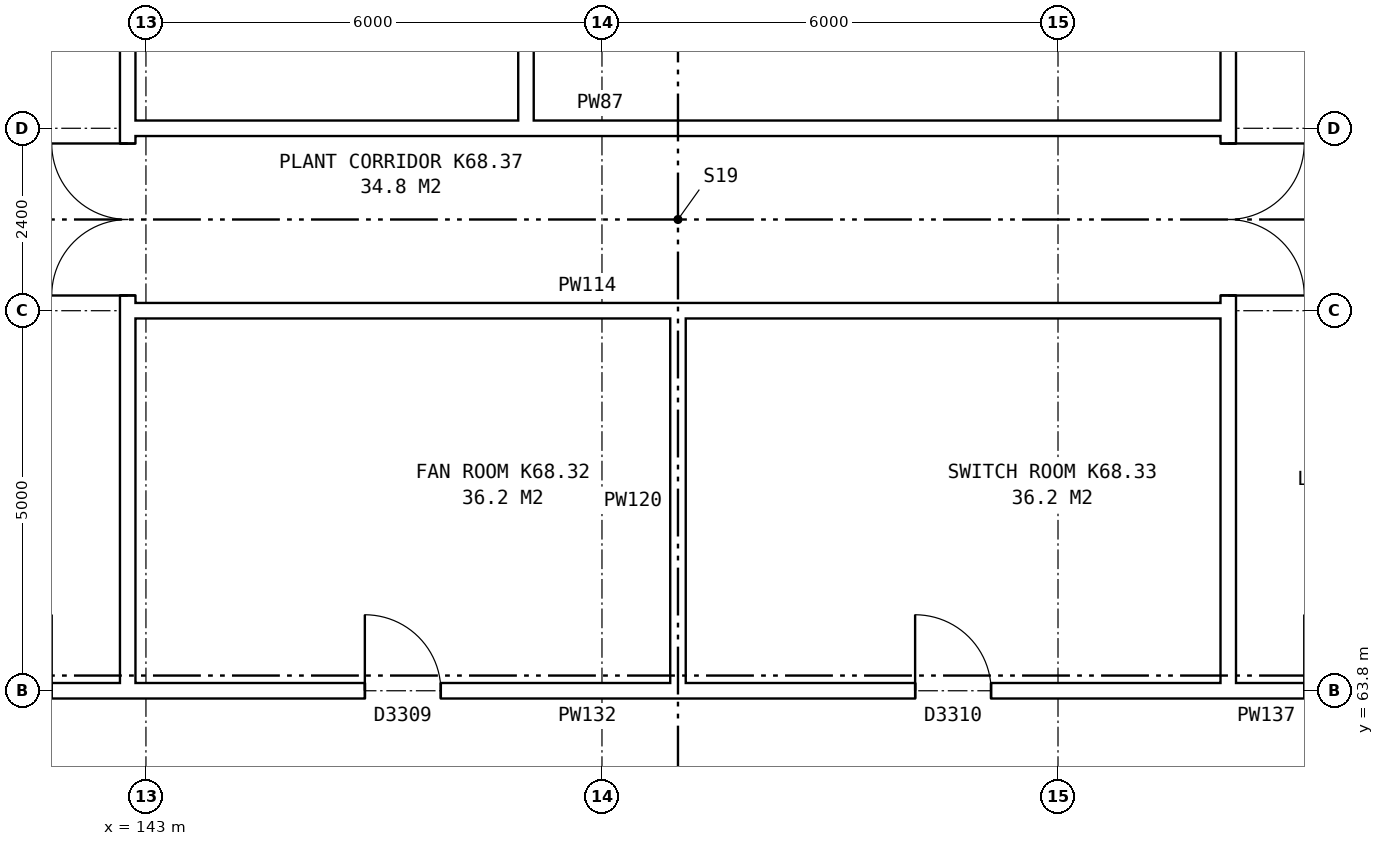
"""IFC4 building model, lengths in metres.
Left out: names, types, materials, properties, quantities, classifications, styles, units other than length and angle.
Written with IfcOpenShell. Run it as: python <this file> out.ifc"""

import sys

from ifc_helpers import new_model, si_unit, direction, frame, frame_2d, origin, place, context, subcontext, project, spatial, rectangle, extrude, element, fill, save


model = new_model("IFC4")
c1 = context("Model", 3, precision=1e-05, world=origin(), true_north=direction((0.0, 1.0)))
c2 = subcontext(c1, "Body", "Model", "MODEL_VIEW")
j1 = project(units=[si_unit("LENGTHUNIT", "METRE"), si_unit("PLANEANGLEUNIT", "RADIAN")], contexts=[c1])
p1 = place(None, origin())
s1 = spatial("IfcSite", under=j1, at=p1, CompositionType="ELEMENT")
p2 = place(p1, origin())
s2 = spatial("IfcBuilding", under=s1, at=p2, CompositionType="ELEMENT")
p3 = place(p2, frame((0.0, 0.0, 243.9)))
s3 = spatial("IfcBuildingStorey", under=s2, at=p3, CompositionType="ELEMENT", Elevation=243.9)
p4 = place(p3, frame((142.76, 63.9, 0.0), z_axis=(0.0, 0.0, 1.0), x_axis=(0.0, 1.0, 0.0)))
e1 = element("IfcWall", 1, at=p4, inside=s3, PredefinedType="PARTITIONING", context=c2, shape_type="SweptSolid", body=[
    extrude(rectangle(XDim=12.2, YDim=0.2, at=frame_2d((6.1, 0.0))), origin(), (0.0, 0.0, 1.0), 3.3),
])
p5 = place(p4, frame((5.1, 0.0, 0.0)))
e2 = element("IfcOpeningElement", 2, at=p5, cuts=e1, PredefinedType="OPENING", context=c2, shape_type="SweptSolid", body=[
    extrude(rectangle(XDim=2.0, YDim=2.1, at=frame_2d((1.0, 1.05))), frame((0.0, 0.11, 0.0), z_axis=(0.0, -1.0, 0.0), x_axis=(1.0, 0.0, 0.0)), (0.0, 0.0, 1.0), 0.22),
])
p6 = place(p3, frame((157.24, 63.9, 0.0), z_axis=(0.0, 0.0, 1.0), x_axis=(0.0, 1.0, 0.0)))
e3 = element("IfcWall", 3, at=p6, inside=s3, PredefinedType="PARTITIONING", context=c2, shape_type="SweptSolid", body=[
    extrude(rectangle(XDim=12.2, YDim=0.2, at=frame_2d((6.1, 0.0))), origin(), (0.0, 0.0, 1.0), 3.3),
])
p7 = place(p6, frame((5.1, 0.0, 0.0)))
e4 = element("IfcOpeningElement", 4, at=p7, cuts=e3, PredefinedType="OPENING", context=c2, shape_type="SweptSolid", body=[
    extrude(rectangle(XDim=2.0, YDim=2.1, at=frame_2d((1.0, 1.05))), frame((0.0, 0.11, 0.0), z_axis=(0.0, -1.0, 0.0), x_axis=(1.0, 0.0, 0.0)), (0.0, 0.0, 1.0), 0.22),
])
p8 = place(p3, frame((142.76, 63.8, 0.0), z_axis=(0.0, 0.0, 1.0), x_axis=(1.0, 0.0, 0.0)))
e5 = element("IfcWall", 5, at=p8, inside=s3, PredefinedType="PARTITIONING", context=c2, shape_type="SweptSolid", body=[
    extrude(rectangle(XDim=14.48, YDim=0.2, at=frame_2d((7.24, 0.0))), origin(), (0.0, 0.0, 1.0), 3.3),
])
p9 = place(p8, frame((3.12, 0.0, 0.0)))
e6 = element("IfcOpeningElement", 6, at=p9, cuts=e5, PredefinedType="OPENING", context=c2, shape_type="SweptSolid", body=[
    extrude(rectangle(XDim=1.0, YDim=2.1, at=frame_2d((0.5, 1.05))), frame((0.0, 0.11, 0.0), z_axis=(0.0, -1.0, 0.0), x_axis=(1.0, 0.0, 0.0)), (0.0, 0.0, 1.0), 0.22),
])
p10 = place(p8, frame((10.36, 0.0, 0.0)))
e7 = element("IfcOpeningElement", 7, at=p10, cuts=e5, PredefinedType="OPENING", context=c2, shape_type="SweptSolid", body=[
    extrude(rectangle(XDim=1.0, YDim=2.1, at=frame_2d((0.5, 1.05))), frame((0.0, 0.11, 0.0), z_axis=(0.0, -1.0, 0.0), x_axis=(1.0, 0.0, 0.0)), (0.0, 0.0, 1.0), 0.22),
])
p11 = place(p3, frame((139.76, 63.8, 0.0), z_axis=(0.0, 0.0, 1.0), x_axis=(1.0, 0.0, 0.0)))
e8 = element("IfcWall", 8, at=p11, inside=s3, PredefinedType="PARTITIONING", context=c2, shape_type="SweptSolid", body=[
    extrude(rectangle(XDim=3.0, YDim=0.2, at=frame_2d((1.5, 0.0))), origin(), (0.0, 0.0, 1.0), 3.3),
])
p12 = place(p11, frame((1.0, 0.0, 0.0)))
e9 = element("IfcOpeningElement", 9, at=p12, cuts=e8, PredefinedType="OPENING", context=c2, shape_type="SweptSolid", body=[
    extrude(rectangle(XDim=1.0, YDim=2.1, at=frame_2d((0.5, 1.05))), frame((0.0, 0.11, 0.0), z_axis=(0.0, -1.0, 0.0), x_axis=(1.0, 0.0, 0.0)), (0.0, 0.0, 1.0), 0.22),
])
p13 = place(p3, frame((157.24, 63.8, 0.0), z_axis=(0.0, 0.0, 1.0), x_axis=(1.0, 0.0, 0.0)))
e10 = element("IfcWall", 10, at=p13, inside=s3, PredefinedType="PARTITIONING", context=c2, shape_type="SweptSolid", body=[
    extrude(rectangle(XDim=3.0, YDim=0.2, at=frame_2d((1.5, 0.0))), origin(), (0.0, 0.0, 1.0), 3.3),
])
p14 = place(p13, frame((1.0, 0.0, 0.0)))
e11 = element("IfcOpeningElement", 11, at=p14, cuts=e10, PredefinedType="OPENING", context=c2, shape_type="SweptSolid", body=[
    extrude(rectangle(XDim=1.0, YDim=2.1, at=frame_2d((0.5, 1.05))), frame((0.0, 0.11, 0.0), z_axis=(0.0, -1.0, 0.0), x_axis=(1.0, 0.0, 0.0)), (0.0, 0.0, 1.0), 0.22),
])
for number, where, z_axis, x_axis in (
    (12, (142.76, 68.8, 0.0), (0.0, 0.0, 1.0), (1.0, 0.0, 0.0)),
    (13, (142.76, 71.2, 0.0), (0.0, 0.0, 1.0), (1.0, 0.0, 0.0)),
):
    element("IfcWall", number, at=place(p3, frame(where, z_axis=z_axis, x_axis=x_axis)), inside=s3, PredefinedType="PARTITIONING", context=c2, shape_type="SweptSolid", body=[
        extrude(rectangle(XDim=14.48, YDim=0.2, at=frame_2d((7.24, 0.0))), origin(), (0.0, 0.0, 1.0), 3.3),
    ])
for number, where, z_axis, x_axis in (
    (14, (148.0, 71.1, 0.0), (0.0, 0.0, 1.0), (0.0, 1.0, 0.0)),
    (15, (150.0, 63.7, 0.0), (0.0, 0.0, 1.0), (0.0, 1.0, 0.0)),
):
    element("IfcWall", number, at=place(p3, frame(where, z_axis=z_axis, x_axis=x_axis)), inside=s3, PredefinedType="PARTITIONING", context=c2, shape_type="SweptSolid", body=[
        extrude(rectangle(XDim=5.2, YDim=0.2, at=frame_2d((2.6, 0.0))), origin(), (0.0, 0.0, 1.0), 3.3),
    ])
p15 = place(p5, origin())
e16 = element("IfcDoor", 16, at=p15, inside=s3, OperationType="DOUBLE_DOOR_SINGLE_SWING", PredefinedType="DOOR", context=c2, shape_type="SweptSolid", body=[
    extrude(rectangle(XDim=2.0, YDim=2.1, at=frame_2d((1.0, 1.05))), frame((0.0, 0.025, 0.0), z_axis=(0.0, -1.0, 0.0), x_axis=(1.0, 0.0, 0.0)), (0.0, 0.0, 1.0), 0.05),
])
fill(e2, e16)
p16 = place(p7, frame((2.0, 0.0, 0.0), z_axis=(0.0, 0.0, 1.0), x_axis=(-1.0, 0.0, 0.0)))
e17 = element("IfcDoor", 17, at=p16, inside=s3, OperationType="DOUBLE_DOOR_SINGLE_SWING", PredefinedType="DOOR", context=c2, shape_type="SweptSolid", body=[
    extrude(rectangle(XDim=2.0, YDim=2.1, at=frame_2d((1.0, 1.05))), frame((0.0, 0.025, 0.0), z_axis=(0.0, -1.0, 0.0), x_axis=(1.0, 0.0, 0.0)), (0.0, 0.0, 1.0), 0.05),
])
fill(e4, e17)
p17 = place(p9, origin())
e18 = element("IfcDoor", 18, at=p17, inside=s3, OperationType="SINGLE_SWING_LEFT", PredefinedType="DOOR", context=c2, shape_type="SweptSolid", body=[
    extrude(rectangle(XDim=1.0, YDim=2.1, at=frame_2d((0.5, 1.05))), frame((0.0, 0.025, 0.0), z_axis=(0.0, -1.0, 0.0), x_axis=(1.0, 0.0, 0.0)), (0.0, 0.0, 1.0), 0.05),
])
fill(e6, e18)
p18 = place(p10, origin())
e19 = element("IfcDoor", 19, at=p18, inside=s3, OperationType="SINGLE_SWING_LEFT", PredefinedType="DOOR", context=c2, shape_type="SweptSolid", body=[
    extrude(rectangle(XDim=1.0, YDim=2.1, at=frame_2d((0.5, 1.05))), frame((0.0, 0.025, 0.0), z_axis=(0.0, -1.0, 0.0), x_axis=(1.0, 0.0, 0.0)), (0.0, 0.0, 1.0), 0.05),
])
fill(e7, e19)
save(model, sys.argv[1])
